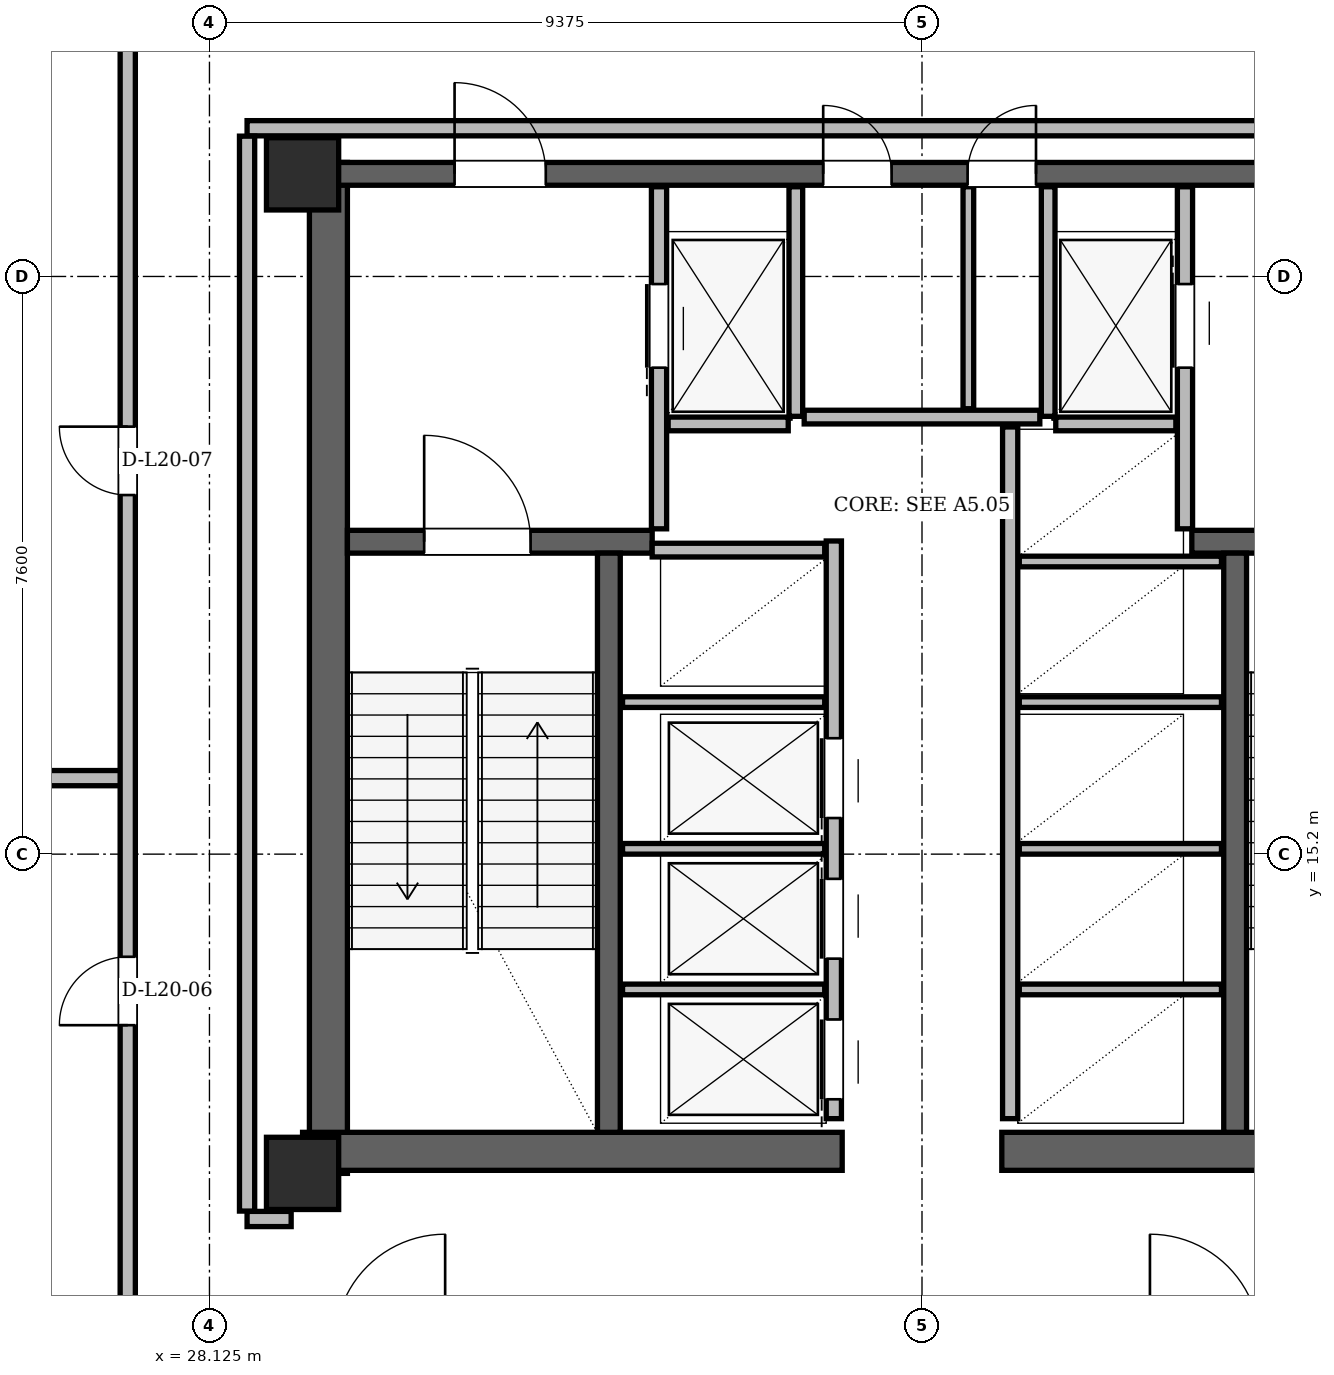
"""IFC4 building model, lengths in metres.
Left out: names, types, materials, properties, quantities, classifications, styles, units other than length and angle.
Written with IfcOpenShell. Run it as: python <this file> out.ifc"""

import sys

from ifc_helpers import new_model, si_unit, direction, frame, frame_2d, origin, origin_2d, place, context, subcontext, project, spatial, rectangle, hollow_rectangle, extrude, element, fill, save


model = new_model("IFC4")
c1 = context("Model", 3, precision=1e-05, world=origin(), true_north=direction((0.0, 1.0)))
c2 = subcontext(c1, "Body", "Model", "MODEL_VIEW")
j1 = project(units=[si_unit("LENGTHUNIT", "METRE"), si_unit("PLANEANGLEUNIT", "RADIAN")], contexts=[c1])
p1 = place(None, origin())
s1 = spatial("IfcSite", under=j1, at=p1, CompositionType="ELEMENT")
p2 = place(p1, origin())
s2 = spatial("IfcBuilding", under=s1, at=p2, CompositionType="ELEMENT")
p3 = place(p2, frame((0.0, 0.0, 77.7)))
s3 = spatial("IfcBuildingStorey", under=s2, at=p3, CompositionType="ELEMENT", Elevation=77.7)
for number, where, z_axis, x_axis in (
    (1, (29.35, 11.0, 0.0), (0.0, 0.0, 1.0), (1.0, 0.0, 0.0)),
    (2, (29.35, 24.15, 0.0), (0.0, 0.0, 1.0), (1.0, 0.0, 0.0)),
):
    element("IfcColumn", number, at=place(p3, frame(where, z_axis=z_axis, x_axis=x_axis)), inside=s3, PredefinedType="COLUMN", context=c2, shape_type="SweptSolid", body=[
        extrude(hollow_rectangle(XDim=0.95, YDim=0.95, WallThickness=0.08, at=origin_2d()), origin(), (0.0, 0.0, 1.0), 4.8),
    ])
p4 = place(p3, frame((29.69, 11.0, 0.0), z_axis=(0.0, 0.0, 1.0), x_axis=(0.0, 1.0, 0.0)))
e3 = element("IfcWall", 3, at=p4, inside=s3, PredefinedType="SHEAR", context=c2, shape_type="SweptSolid", body=[
    extrude(rectangle(XDim=13.3, YDim=0.5, at=frame_2d((6.65, 0.0))), origin(), (0.0, 0.0, 1.0), 4.56),
])
for number, where, z_axis, x_axis in (
    (4, (29.35, 11.29, 0.0), (0.0, 0.0, 1.0), (1.0, 0.0, 0.0)),
    (5, (38.55, 11.29, 0.0), (0.0, 0.0, 1.0), (1.0, 0.0, 0.0)),
):
    element("IfcWall", number, at=place(p3, frame(where, z_axis=z_axis, x_axis=x_axis)), inside=s3, PredefinedType="SHEAR", context=c2, shape_type="SweptSolid", body=[
        extrude(rectangle(XDim=7.1, YDim=0.5, at=frame_2d((3.55, 0.0))), origin(), (0.0, 0.0, 1.0), 4.56),
    ])
p5 = place(p3, frame((29.65, 24.15, 0.0), z_axis=(0.0, 0.0, 1.0), x_axis=(1.0, 0.0, 0.0)))
e6 = element("IfcWall", 6, at=p5, inside=s3, PredefinedType="SHEAR", context=c2, shape_type="SweptSolid", body=[
    extrude(rectangle(XDim=15.7, YDim=0.3, at=frame_2d((7.85, 0.0))), origin(), (0.0, 0.0, 1.0), 4.56),
])
p6 = place(p5, frame((1.7, 0.0, 0.0)))
e7 = element("IfcOpeningElement", 7, at=p6, cuts=e6, PredefinedType="OPENING", context=c2, shape_type="SweptSolid", body=[
    extrude(rectangle(XDim=1.2, YDim=2.2, at=frame_2d((0.6, 1.1))), frame((0.0, 0.15, 0.0), z_axis=(0.0, -1.0, 0.0), x_axis=(1.0, 0.0, 0.0)), (0.0, 0.0, 1.0), 0.3),
])
p7 = place(p5, frame((12.8, 0.0, 0.0)))
e8 = element("IfcOpeningElement", 8, at=p7, cuts=e6, PredefinedType="OPENING", context=c2, shape_type="SweptSolid", body=[
    extrude(rectangle(XDim=1.2, YDim=2.2, at=frame_2d((0.6, 1.1))), frame((0.0, 0.15, 0.0), z_axis=(0.0, -1.0, 0.0), x_axis=(1.0, 0.0, 0.0)), (0.0, 0.0, 1.0), 0.3),
])
p8 = place(p5, frame((6.55, 0.0, 0.0)))
e9 = element("IfcOpeningElement", 9, at=p8, cuts=e6, PredefinedType="OPENING", context=c2, shape_type="SweptSolid", body=[
    extrude(rectangle(XDim=0.9, YDim=2.05, at=frame_2d((0.45, 1.025))), frame((0.0, 0.15, 0.0), z_axis=(0.0, -1.0, 0.0), x_axis=(1.0, 0.0, 0.0)), (0.0, 0.0, 1.0), 0.3),
])
p9 = place(p5, frame((8.45, 0.0, 0.0)))
e10 = element("IfcOpeningElement", 10, at=p9, cuts=e6, PredefinedType="OPENING", context=c2, shape_type="SweptSolid", body=[
    extrude(rectangle(XDim=0.9, YDim=2.05, at=frame_2d((0.45, 1.025))), frame((0.0, 0.15, 0.0), z_axis=(0.0, -1.0, 0.0), x_axis=(1.0, 0.0, 0.0)), (0.0, 0.0, 1.0), 0.3),
])
p10 = place(p3, frame((29.94, 19.31, 0.0), z_axis=(0.0, 0.0, 1.0), x_axis=(1.0, 0.0, 0.0)))
e11 = element("IfcWall", 11, at=p10, inside=s3, PredefinedType="SHEAR", context=c2, shape_type="SweptSolid", body=[
    extrude(rectangle(XDim=4.01, YDim=0.3, at=frame_2d((2.005, 0.0))), origin(), (0.0, 0.0, 1.0), 4.56),
])
p11 = place(p10, frame((1.01, 0.0, 0.0)))
e12 = element("IfcOpeningElement", 12, at=p11, cuts=e11, PredefinedType="OPENING", context=c2, shape_type="SweptSolid", body=[
    extrude(rectangle(XDim=1.4, YDim=2.2, at=frame_2d((0.7, 1.1))), frame((0.0, 0.15, 0.0), z_axis=(0.0, -1.0, 0.0), x_axis=(1.0, 0.0, 0.0)), (0.0, 0.0, 1.0), 0.3),
])
p12 = place(p3, frame((41.05, 19.31, 0.0), z_axis=(0.0, 0.0, 1.0), x_axis=(1.0, 0.0, 0.0)))
e13 = element("IfcWall", 13, at=p12, inside=s3, PredefinedType="SHEAR", context=c2, shape_type="SweptSolid", body=[
    extrude(rectangle(XDim=4.01, YDim=0.3, at=frame_2d((2.005, 0.0))), origin(), (0.0, 0.0, 1.0), 4.56),
])
p13 = place(p12, frame((1.6, 0.0, 0.0)))
e14 = element("IfcOpeningElement", 14, at=p13, cuts=e13, PredefinedType="OPENING", context=c2, shape_type="SweptSolid", body=[
    extrude(rectangle(XDim=1.4, YDim=2.2, at=frame_2d((0.7, 1.1))), frame((0.0, 0.15, 0.0), z_axis=(0.0, -1.0, 0.0), x_axis=(1.0, 0.0, 0.0)), (0.0, 0.0, 1.0), 0.3),
])
for number, where, z_axis, x_axis in (
    (15, (33.38, 11.54, 0.0), (0.0, 0.0, 1.0), (0.0, 1.0, 0.0)),
    (16, (41.62, 11.54, 0.0), (0.0, 0.0, 1.0), (0.0, 1.0, 0.0)),
):
    element("IfcWall", number, at=place(p3, frame(where, z_axis=z_axis, x_axis=x_axis)), inside=s3, PredefinedType="SHEAR", context=c2, shape_type="SweptSolid", body=[
        extrude(rectangle(XDim=7.62, YDim=0.3, at=frame_2d((3.81, 0.0))), origin(), (0.0, 0.0, 1.0), 4.56),
    ])
p14 = place(p3, frame((30.978, 43.509, 0.0), z_axis=(0.0, 0.0, 1.0), x_axis=(-0.499997825845, -0.86602665903, 0.0)))
e17 = element("IfcWall", 17, at=p14, inside=s3, PredefinedType="SOLIDWALL", context=c2, shape_type="SweptSolid", body=[
    extrude(rectangle(XDim=34.024, YDim=0.34, at=frame_2d((17.012, 0.0))), origin(), (0.0, 0.0, 1.0), 3.55),
])
p15 = place(p3, frame((34.04, 19.48, 0.0), z_axis=(0.0, 0.0, 1.0), x_axis=(0.0, 1.0, 0.0)))
e18 = element("IfcWall", 18, at=p15, inside=s3, PredefinedType="PARTITIONING", context=c2, shape_type="SweptSolid", body=[
    extrude(rectangle(XDim=4.5, YDim=0.2, at=frame_2d((2.25, 0.0))), origin(), (0.0, 0.0, 1.0), 3.6),
])
p16 = place(p15, frame((2.12, 0.0, 0.0)))
e19 = element("IfcOpeningElement", 19, at=p16, cuts=e18, PredefinedType="OPENING", context=c2, shape_type="SweptSolid", body=[
    extrude(rectangle(XDim=1.1, YDim=2.2, at=frame_2d((0.55, 1.1))), frame((0.0, 0.1, 0.0), z_axis=(0.0, -1.0, 0.0), x_axis=(1.0, 0.0, 0.0)), (0.0, 0.0, 1.0), 0.2),
])
p17 = place(p3, frame((35.84, 20.96, 0.0), z_axis=(0.0, 0.0, 1.0), x_axis=(0.0, 1.0, 0.0)))
e20 = element("IfcWall", 20, at=p17, inside=s3, PredefinedType="PARTITIONING", context=c2, shape_type="SweptSolid", body=[
    extrude(rectangle(XDim=3.02, YDim=0.18, at=frame_2d((1.51, 0.0))), origin(), (0.0, 0.0, 1.0), 3.6),
])
p18 = place(p3, frame((34.16, 20.86, 0.0), z_axis=(0.0, 0.0, 1.0), x_axis=(1.0, 0.0, 0.0)))
e21 = element("IfcWall", 21, at=p18, inside=s3, PredefinedType="PARTITIONING", context=c2, shape_type="SweptSolid", body=[
    extrude(rectangle(XDim=1.58, YDim=0.18, at=frame_2d((0.79, 0.0))), origin(), (0.0, 0.0, 1.0), 4.56),
])
p19 = place(p3, frame((40.96, 19.48, 0.0), z_axis=(0.0, 0.0, 1.0), x_axis=(0.0, 1.0, 0.0)))
e22 = element("IfcWall", 22, at=p19, inside=s3, PredefinedType="PARTITIONING", context=c2, shape_type="SweptSolid", body=[
    extrude(rectangle(XDim=4.5, YDim=0.2, at=frame_2d((2.25, 0.0))), origin(), (0.0, 0.0, 1.0), 3.6),
])
p20 = place(p19, frame((2.12, 0.0, 0.0)))
e23 = element("IfcOpeningElement", 23, at=p20, cuts=e22, PredefinedType="OPENING", context=c2, shape_type="SweptSolid", body=[
    extrude(rectangle(XDim=1.1, YDim=2.2, at=frame_2d((0.55, 1.1))), frame((0.0, 0.1, 0.0), z_axis=(0.0, -1.0, 0.0), x_axis=(1.0, 0.0, 0.0)), (0.0, 0.0, 1.0), 0.2),
])
p21 = place(p3, frame((39.16, 20.96, 0.0), z_axis=(0.0, 0.0, 1.0), x_axis=(0.0, 1.0, 0.0)))
e24 = element("IfcWall", 24, at=p21, inside=s3, PredefinedType="PARTITIONING", context=c2, shape_type="SweptSolid", body=[
    extrude(rectangle(XDim=3.02, YDim=0.18, at=frame_2d((1.51, 0.0))), origin(), (0.0, 0.0, 1.0), 3.6),
])
p22 = place(p3, frame((39.26, 20.86, 0.0), z_axis=(0.0, 0.0, 1.0), x_axis=(1.0, 0.0, 0.0)))
e25 = element("IfcWall", 25, at=p22, inside=s3, PredefinedType="PARTITIONING", context=c2, shape_type="SweptSolid", body=[
    extrude(rectangle(XDim=1.58, YDim=0.18, at=frame_2d((0.79, 0.0))), origin(), (0.0, 0.0, 1.0), 4.56),
])
p23 = place(p3, frame((36.34, 11.72, 0.0), z_axis=(0.0, 0.0, 1.0), x_axis=(0.0, 1.0, 0.0)))
e26 = element("IfcWall", 26, at=p23, inside=s3, PredefinedType="PARTITIONING", context=c2, shape_type="SweptSolid", body=[
    extrude(rectangle(XDim=7.6, YDim=0.2, at=frame_2d((3.8, 0.0))), origin(), (0.0, 0.0, 1.0), 4.56),
])
p24 = place(p23, frame((0.255, 0.0, 0.0)))
e27 = element("IfcOpeningElement", 27, at=p24, cuts=e26, PredefinedType="OPENING", context=c2, shape_type="SweptSolid", body=[
    extrude(rectangle(XDim=1.05, YDim=2.15, at=frame_2d((0.525, 1.075))), frame((0.0, 0.1, 0.0), z_axis=(0.0, -1.0, 0.0), x_axis=(1.0, 0.0, 0.0)), (0.0, 0.0, 1.0), 0.2),
])
p25 = place(p23, frame((2.105, 0.0, 0.0)))
e28 = element("IfcOpeningElement", 28, at=p25, cuts=e26, PredefinedType="OPENING", context=c2, shape_type="SweptSolid", body=[
    extrude(rectangle(XDim=1.05, YDim=2.15, at=frame_2d((0.525, 1.075))), frame((0.0, 0.1, 0.0), z_axis=(0.0, -1.0, 0.0), x_axis=(1.0, 0.0, 0.0)), (0.0, 0.0, 1.0), 0.2),
])
p26 = place(p23, frame((3.955, 0.0, 0.0)))
e29 = element("IfcOpeningElement", 29, at=p26, cuts=e26, PredefinedType="OPENING", context=c2, shape_type="SweptSolid", body=[
    extrude(rectangle(XDim=1.05, YDim=2.15, at=frame_2d((0.525, 1.075))), frame((0.0, 0.1, 0.0), z_axis=(0.0, -1.0, 0.0), x_axis=(1.0, 0.0, 0.0)), (0.0, 0.0, 1.0), 0.2),
])
p27 = place(p3, frame((33.95, 19.2, 0.0), z_axis=(0.0, 0.0, 1.0), x_axis=(1.0, 0.0, 0.0)))
e30 = element("IfcWall", 30, at=p27, inside=s3, PredefinedType="PARTITIONING", context=c2, shape_type="SweptSolid", body=[
    extrude(rectangle(XDim=2.27, YDim=0.18, at=frame_2d((1.135, 0.0))), origin(), (0.0, 0.0, 1.0), 4.56),
])
for number, where, z_axis, x_axis in (
    (31, (33.56, 13.42, 0.0), (0.0, 0.0, 1.0), (1.0, 0.0, 0.0)),
    (32, (33.56, 15.27, 0.0), (0.0, 0.0, 1.0), (1.0, 0.0, 0.0)),
    (33, (33.56, 17.2, 0.0), (0.0, 0.0, 1.0), (1.0, 0.0, 0.0)),
):
    element("IfcWall", number, at=place(p3, frame(where, z_axis=z_axis, x_axis=x_axis)), inside=s3, PredefinedType="PARTITIONING", context=c2, shape_type="SweptSolid", body=[
        extrude(rectangle(XDim=2.66, YDim=0.14, at=frame_2d((1.33, 0.0))), origin(), (0.0, 0.0, 1.0), 4.56),
    ])
p28 = place(p3, frame((38.66, 11.72, 0.0), z_axis=(0.0, 0.0, 1.0), x_axis=(0.0, 1.0, 0.0)))
e34 = element("IfcWall", 34, at=p28, inside=s3, PredefinedType="PARTITIONING", context=c2, shape_type="SweptSolid", body=[
    extrude(rectangle(XDim=9.1, YDim=0.2, at=frame_2d((4.55, 0.0))), origin(), (0.0, 0.0, 1.0), 4.56),
])
for number, where, z_axis, x_axis in (
    (35, (38.78, 13.42, 0.0), (0.0, 0.0, 1.0), (1.0, 0.0, 0.0)),
    (36, (38.78, 15.27, 0.0), (0.0, 0.0, 1.0), (1.0, 0.0, 0.0)),
    (37, (38.78, 17.2, 0.0), (0.0, 0.0, 1.0), (1.0, 0.0, 0.0)),
    (38, (38.78, 19.05, 0.0), (0.0, 0.0, 1.0), (1.0, 0.0, 0.0)),
):
    element("IfcWall", number, at=place(p3, frame(where, z_axis=z_axis, x_axis=x_axis)), inside=s3, PredefinedType="PARTITIONING", context=c2, shape_type="SweptSolid", body=[
        extrude(rectangle(XDim=2.66, YDim=0.14, at=frame_2d((1.33, 0.0))), origin(), (0.0, 0.0, 1.0), 4.56),
    ])
p29 = place(p3, frame((35.95, 20.95, 0.0), z_axis=(0.0, 0.0, 1.0), x_axis=(1.0, 0.0, 0.0)))
e39 = element("IfcWall", 39, at=p29, inside=s3, PredefinedType="PARTITIONING", context=c2, shape_type="SweptSolid", body=[
    extrude(rectangle(XDim=3.1, YDim=0.18, at=frame_2d((1.55, 0.0))), origin(), (0.0, 0.0, 1.0), 4.56),
])
p30 = place(p3, frame((38.11, 21.06, 0.0), z_axis=(0.0, 0.0, 1.0), x_axis=(0.0, 1.0, 0.0)))
e40 = element("IfcWall", 40, at=p30, inside=s3, PredefinedType="PARTITIONING", context=c2, shape_type="SweptSolid", body=[
    extrude(rectangle(XDim=2.92, YDim=0.14, at=frame_2d((1.46, 0.0))), origin(), (0.0, 0.0, 1.0), 3.6),
])
p31 = place(p3, frame((28.62, 10.4, 0.0), z_axis=(0.0, 0.0, 1.0), x_axis=(1.0, 0.0, 0.0)))
e41 = element("IfcWall", 41, at=p31, inside=s3, PredefinedType="PARTITIONING", context=c2, shape_type="SweptSolid", body=[
    extrude(rectangle(XDim=0.58, YDim=0.2, at=frame_2d((0.29, 0.0))), origin(), (0.0, 0.0, 1.0), 3.938),
])
p32 = place(p3, frame((15.412, 16.2, 0.0), z_axis=(0.0, 0.0, 1.0), x_axis=(1.0, 0.0, 0.0)))
e42 = element("IfcWall", 42, at=p32, inside=s3, PredefinedType="PARTITIONING", context=c2, shape_type="SweptSolid", body=[
    extrude(rectangle(XDim=11.638, YDim=0.2, at=frame_2d((5.819, 0.0))), origin(), (0.0, 0.0, 1.0), 3.55),
])
p33 = place(p3, frame((28.62, 24.75, 0.0), z_axis=(0.0, 0.0, 1.0), x_axis=(1.0, 0.0, 0.0)))
e43 = element("IfcWall", 43, at=p33, inside=s3, PredefinedType="PARTITIONING", context=c2, shape_type="SweptSolid", body=[
    extrude(rectangle(XDim=19.98, YDim=0.2, at=frame_2d((9.99, 0.0))), origin(), (0.0, 0.0, 1.0), 3.938),
])
p34 = place(p3, frame((27.05, 8.854, 0.0), z_axis=(0.0, 0.0, 1.0), x_axis=(0.0, 1.0, 0.0)))
e44 = element("IfcWall", 44, at=p34, inside=s3, PredefinedType="PARTITIONING", context=c2, shape_type="SweptSolid", body=[
    extrude(rectangle(XDim=17.442, YDim=0.2, at=frame_2d((8.721, 0.0))), origin(), (0.0, 0.0, 1.0), 3.938),
])
p35 = place(p34, frame((4.096, 0.0, 0.0)))
e45 = element("IfcOpeningElement", 45, at=p35, cuts=e44, PredefinedType="OPENING", context=c2, shape_type="SweptSolid", body=[
    extrude(rectangle(XDim=0.9, YDim=2.05, at=frame_2d((0.45, 1.025))), frame((0.0, 0.1, 0.0), z_axis=(0.0, -1.0, 0.0), x_axis=(1.0, 0.0, 0.0)), (0.0, 0.0, 1.0), 0.2),
])
p36 = place(p34, frame((11.07, 0.0, 0.0)))
e46 = element("IfcOpeningElement", 46, at=p36, cuts=e44, PredefinedType="OPENING", context=c2, shape_type="SweptSolid", body=[
    extrude(rectangle(XDim=0.9, YDim=2.05, at=frame_2d((0.45, 1.025))), frame((0.0, 0.1, 0.0), z_axis=(0.0, -1.0, 0.0), x_axis=(1.0, 0.0, 0.0)), (0.0, 0.0, 1.0), 0.2),
])
p37 = place(p3, frame((28.62, 10.504, 0.0), z_axis=(0.0, 0.0, 1.0), x_axis=(0.0, 1.0, 0.0)))
e47 = element("IfcWall", 47, at=p37, inside=s3, PredefinedType="PARTITIONING", context=c2, shape_type="SweptSolid", body=[
    extrude(rectangle(XDim=14.142, YDim=0.2, at=frame_2d((7.071, 0.0))), origin(), (0.0, 0.0, 1.0), 3.938),
])
p38 = place(p16, origin())
e48 = element("IfcDoor", 48, at=p38, inside=s3, OperationType="SLIDING_TO_LEFT", PredefinedType="DOOR", context=c2, shape_type="SweptSolid", body=[
    extrude(rectangle(XDim=1.1, YDim=2.2, at=frame_2d((0.55, 1.1))), frame((0.0, 0.025, 0.0), z_axis=(0.0, -1.0, 0.0), x_axis=(1.0, 0.0, 0.0)), (0.0, 0.0, 1.0), 0.05),
])
fill(e19, e48)
p39 = place(p20, origin())
e49 = element("IfcDoor", 49, at=p39, inside=s3, OperationType="SLIDING_TO_RIGHT", PredefinedType="DOOR", context=c2, shape_type="SweptSolid", body=[
    extrude(rectangle(XDim=1.1, YDim=2.2, at=frame_2d((0.55, 1.1))), frame((0.0, 0.025, 0.0), z_axis=(0.0, -1.0, 0.0), x_axis=(1.0, 0.0, 0.0)), (0.0, 0.0, 1.0), 0.05),
])
fill(e23, e49)
p40 = place(p24, origin())
e50 = element("IfcDoor", 50, at=p40, inside=s3, OperationType="SLIDING_TO_LEFT", PredefinedType="DOOR", context=c2, shape_type="SweptSolid", body=[
    extrude(rectangle(XDim=1.05, YDim=2.15, at=frame_2d((0.525, 1.075))), frame((0.0, 0.025, 0.0), z_axis=(0.0, -1.0, 0.0), x_axis=(1.0, 0.0, 0.0)), (0.0, 0.0, 1.0), 0.05),
])
fill(e27, e50)
p41 = place(p25, origin())
e51 = element("IfcDoor", 51, at=p41, inside=s3, OperationType="SLIDING_TO_RIGHT", PredefinedType="DOOR", context=c2, shape_type="SweptSolid", body=[
    extrude(rectangle(XDim=1.05, YDim=2.15, at=frame_2d((0.525, 1.075))), frame((0.0, 0.025, 0.0), z_axis=(0.0, -1.0, 0.0), x_axis=(1.0, 0.0, 0.0)), (0.0, 0.0, 1.0), 0.05),
])
fill(e28, e51)
p42 = place(p26, origin())
e52 = element("IfcDoor", 52, at=p42, inside=s3, OperationType="SLIDING_TO_LEFT", PredefinedType="DOOR", context=c2, shape_type="SweptSolid", body=[
    extrude(rectangle(XDim=1.05, YDim=2.15, at=frame_2d((0.525, 1.075))), frame((0.0, 0.025, 0.0), z_axis=(0.0, -1.0, 0.0), x_axis=(1.0, 0.0, 0.0)), (0.0, 0.0, 1.0), 0.05),
])
fill(e29, e52)
p43 = place(p11, origin())
e53 = element("IfcDoor", 53, at=p43, inside=s3, OperationType="SINGLE_SWING_LEFT", PredefinedType="DOOR", context=c2, shape_type="SweptSolid", body=[
    extrude(rectangle(XDim=1.4, YDim=2.2, at=frame_2d((0.7, 1.1))), frame((0.0, 0.025, 0.0), z_axis=(0.0, -1.0, 0.0), x_axis=(1.0, 0.0, 0.0)), (0.0, 0.0, 1.0), 0.05),
])
fill(e12, e53)
p44 = place(p6, origin())
e54 = element("IfcDoor", 54, at=p44, inside=s3, OperationType="SINGLE_SWING_LEFT", PredefinedType="DOOR", context=c2, shape_type="SweptSolid", body=[
    extrude(rectangle(XDim=1.2, YDim=2.2, at=frame_2d((0.6, 1.1))), frame((0.0, 0.025, 0.0), z_axis=(0.0, -1.0, 0.0), x_axis=(1.0, 0.0, 0.0)), (0.0, 0.0, 1.0), 0.05),
])
fill(e7, e54)
p45 = place(p8, origin())
e55 = element("IfcDoor", 55, at=p45, inside=s3, OperationType="SINGLE_SWING_LEFT", PredefinedType="DOOR", context=c2, shape_type="SweptSolid", body=[
    extrude(rectangle(XDim=0.9, YDim=2.05, at=frame_2d((0.45, 1.025))), frame((0.0, 0.025, 0.0), z_axis=(0.0, -1.0, 0.0), x_axis=(1.0, 0.0, 0.0)), (0.0, 0.0, 1.0), 0.05),
])
fill(e9, e55)
p46 = place(p9, origin())
e56 = element("IfcDoor", 56, at=p46, inside=s3, OperationType="SINGLE_SWING_RIGHT", PredefinedType="DOOR", context=c2, shape_type="SweptSolid", body=[
    extrude(rectangle(XDim=0.9, YDim=2.05, at=frame_2d((0.45, 1.025))), frame((0.0, 0.025, 0.0), z_axis=(0.0, -1.0, 0.0), x_axis=(1.0, 0.0, 0.0)), (0.0, 0.0, 1.0), 0.05),
])
fill(e10, e56)
p47 = place(p35, origin())
e57 = element("IfcDoor", 57, at=p47, inside=s3, OperationType="SINGLE_SWING_LEFT", PredefinedType="DOOR", context=c2, shape_type="SweptSolid", body=[
    extrude(rectangle(XDim=0.9, YDim=2.05, at=frame_2d((0.45, 1.025))), frame((0.0, 0.025, 0.0), z_axis=(0.0, -1.0, 0.0), x_axis=(1.0, 0.0, 0.0)), (0.0, 0.0, 1.0), 0.05),
])
fill(e45, e57)
p48 = place(p36, origin())
e58 = element("IfcDoor", 58, at=p48, inside=s3, OperationType="SINGLE_SWING_RIGHT", PredefinedType="DOOR", context=c2, shape_type="SweptSolid", body=[
    extrude(rectangle(XDim=0.9, YDim=2.05, at=frame_2d((0.45, 1.025))), frame((0.0, 0.025, 0.0), z_axis=(0.0, -1.0, 0.0), x_axis=(1.0, 0.0, 0.0)), (0.0, 0.0, 1.0), 0.05),
])
fill(e46, e58)
save(model, sys.argv[1])
